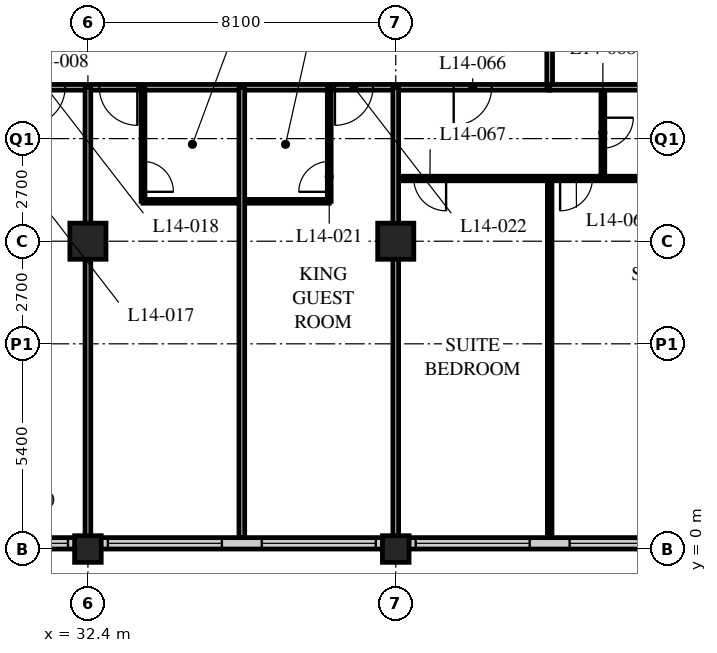
"""IFC4 building model, lengths in metres.
Left out: names, types, materials, properties, quantities, classifications, styles, units other than length and angle.
Written with IfcOpenShell. Run it as: python <this file> out.ifc"""

import sys

from ifc_helpers import new_model, si_unit, direction, frame, frame_2d, origin, origin_2d, place, context, subcontext, project, spatial, rectangle, hollow_rectangle, extrude, element, fill, save


model = new_model("IFC4")
c1 = context("Model", 3, precision=1e-05, world=origin(), true_north=direction((0.0, 1.0)))
c2 = subcontext(c1, "Body", "Model", "MODEL_VIEW")
j1 = project(units=[si_unit("LENGTHUNIT", "METRE"), si_unit("PLANEANGLEUNIT", "RADIAN")], contexts=[c1])
p1 = place(None, origin())
s1 = spatial("IfcSite", under=j1, at=p1, CompositionType="ELEMENT")
p2 = place(p1, origin())
s2 = spatial("IfcBuilding", under=s1, at=p2, CompositionType="ELEMENT")
p3 = place(p2, frame((0.0, 0.0, 60.2)))
s3 = spatial("IfcBuildingStorey", under=s2, at=p3, CompositionType="ELEMENT", Elevation=60.2)
p4 = place(p3, frame((32.4, 0.0, 0.0), z_axis=(0.0, 0.0, 1.0), x_axis=(1.0, 0.0, 0.0)))
e1 = element("IfcColumn", 1, at=p4, inside=s3, PredefinedType="COLUMN", context=c2, shape_type="SweptSolid", body=[
    extrude(hollow_rectangle(XDim=0.7, YDim=0.7, WallThickness=0.06, at=origin_2d()), origin(), (0.0, 0.0, 1.0), 3.4),
])
p5 = place(p3, frame((32.4, 8.1, 0.0), z_axis=(0.0, 0.0, 1.0), x_axis=(1.0, 0.0, 0.0)))
e2 = element("IfcColumn", 2, at=p5, inside=s3, PredefinedType="COLUMN", context=c2, shape_type="SweptSolid", body=[
    extrude(hollow_rectangle(XDim=0.95, YDim=0.95, WallThickness=0.095, at=origin_2d()), origin(), (0.0, 0.0, 1.0), 3.4),
])
p6 = place(p3, frame((40.5, 0.0, 0.0), z_axis=(0.0, 0.0, 1.0), x_axis=(1.0, 0.0, 0.0)))
e3 = element("IfcColumn", 3, at=p6, inside=s3, PredefinedType="COLUMN", context=c2, shape_type="SweptSolid", body=[
    extrude(hollow_rectangle(XDim=0.7, YDim=0.7, WallThickness=0.06, at=origin_2d()), origin(), (0.0, 0.0, 1.0), 3.4),
])
p7 = place(p3, frame((40.5, 8.1, 0.0), z_axis=(0.0, 0.0, 1.0), x_axis=(1.0, 0.0, 0.0)))
e4 = element("IfcColumn", 4, at=p7, inside=s3, PredefinedType="COLUMN", context=c2, shape_type="SweptSolid", body=[
    extrude(hollow_rectangle(XDim=0.95, YDim=0.95, WallThickness=0.095, at=origin_2d()), origin(), (0.0, 0.0, 1.0), 3.4),
])
p8 = place(p3, frame((8.4, 0.15, 0.0), z_axis=(0.0, 0.0, 1.0), x_axis=(1.0, 0.0, 0.0)))
e5 = element("IfcWall", 5, at=p8, inside=s3, PredefinedType="SOLIDWALL", context=c2, shape_type="SweptSolid", body=[
    extrude(rectangle(XDim=40.2, YDim=0.3, at=frame_2d((20.1, 0.0))), origin(), (0.0, 0.0, 1.0), 3.19),
])
p9 = place(p8, frame((0.225, 0.0, 0.9)))
e6 = element("IfcOpeningElement", 6, at=p9, cuts=e5, PredefinedType="OPENING", context=c2, shape_type="SweptSolid", body=[
    extrude(rectangle(XDim=3.0, YDim=2.0, at=frame_2d((1.5, 1.0))), frame((0.0, 0.16, 0.0), z_axis=(0.0, -1.0, 0.0), x_axis=(1.0, 0.0, 0.0)), (0.0, 0.0, 1.0), 0.32),
])
p10 = place(p8, frame((4.275, 0.0, 0.9)))
e7 = element("IfcOpeningElement", 7, at=p10, cuts=e5, PredefinedType="OPENING", context=c2, shape_type="SweptSolid", body=[
    extrude(rectangle(XDim=3.0, YDim=2.0, at=frame_2d((1.5, 1.0))), frame((0.0, 0.16, 0.0), z_axis=(0.0, -1.0, 0.0), x_axis=(1.0, 0.0, 0.0)), (0.0, 0.0, 1.0), 0.32),
])
p11 = place(p8, frame((8.325, 0.0, 0.9)))
e8 = element("IfcOpeningElement", 8, at=p11, cuts=e5, PredefinedType="OPENING", context=c2, shape_type="SweptSolid", body=[
    extrude(rectangle(XDim=3.0, YDim=2.0, at=frame_2d((1.5, 1.0))), frame((0.0, 0.16, 0.0), z_axis=(0.0, -1.0, 0.0), x_axis=(1.0, 0.0, 0.0)), (0.0, 0.0, 1.0), 0.32),
])
p12 = place(p8, frame((12.375, 0.0, 0.9)))
e9 = element("IfcOpeningElement", 9, at=p12, cuts=e5, PredefinedType="OPENING", context=c2, shape_type="SweptSolid", body=[
    extrude(rectangle(XDim=3.0, YDim=2.0, at=frame_2d((1.5, 1.0))), frame((0.0, 0.16, 0.0), z_axis=(0.0, -1.0, 0.0), x_axis=(1.0, 0.0, 0.0)), (0.0, 0.0, 1.0), 0.32),
])
p13 = place(p8, frame((16.425, 0.0, 0.9)))
e10 = element("IfcOpeningElement", 10, at=p13, cuts=e5, PredefinedType="OPENING", context=c2, shape_type="SweptSolid", body=[
    extrude(rectangle(XDim=3.0, YDim=2.0, at=frame_2d((1.5, 1.0))), frame((0.0, 0.16, 0.0), z_axis=(0.0, -1.0, 0.0), x_axis=(1.0, 0.0, 0.0)), (0.0, 0.0, 1.0), 0.32),
])
p14 = place(p8, frame((20.475, 0.0, 0.9)))
e11 = element("IfcOpeningElement", 11, at=p14, cuts=e5, PredefinedType="OPENING", context=c2, shape_type="SweptSolid", body=[
    extrude(rectangle(XDim=3.0, YDim=2.0, at=frame_2d((1.5, 1.0))), frame((0.0, 0.16, 0.0), z_axis=(0.0, -1.0, 0.0), x_axis=(1.0, 0.0, 0.0)), (0.0, 0.0, 1.0), 0.32),
])
p15 = place(p8, frame((24.525, 0.0, 0.9)))
e12 = element("IfcOpeningElement", 12, at=p15, cuts=e5, PredefinedType="OPENING", context=c2, shape_type="SweptSolid", body=[
    extrude(rectangle(XDim=3.0, YDim=2.0, at=frame_2d((1.5, 1.0))), frame((0.0, 0.16, 0.0), z_axis=(0.0, -1.0, 0.0), x_axis=(1.0, 0.0, 0.0)), (0.0, 0.0, 1.0), 0.32),
])
p16 = place(p8, frame((28.575, 0.0, 0.9)))
e13 = element("IfcOpeningElement", 13, at=p16, cuts=e5, PredefinedType="OPENING", context=c2, shape_type="SweptSolid", body=[
    extrude(rectangle(XDim=3.0, YDim=2.0, at=frame_2d((1.5, 1.0))), frame((0.0, 0.16, 0.0), z_axis=(0.0, -1.0, 0.0), x_axis=(1.0, 0.0, 0.0)), (0.0, 0.0, 1.0), 0.32),
])
p17 = place(p8, frame((32.625, 0.0, 0.9)))
e14 = element("IfcOpeningElement", 14, at=p17, cuts=e5, PredefinedType="OPENING", context=c2, shape_type="SweptSolid", body=[
    extrude(rectangle(XDim=3.0, YDim=2.0, at=frame_2d((1.5, 1.0))), frame((0.0, 0.16, 0.0), z_axis=(0.0, -1.0, 0.0), x_axis=(1.0, 0.0, 0.0)), (0.0, 0.0, 1.0), 0.32),
])
p18 = place(p8, frame((36.675, 0.0, 0.9)))
e15 = element("IfcOpeningElement", 15, at=p18, cuts=e5, PredefinedType="OPENING", context=c2, shape_type="SweptSolid", body=[
    extrude(rectangle(XDim=3.0, YDim=2.0, at=frame_2d((1.5, 1.0))), frame((0.0, 0.16, 0.0), z_axis=(0.0, -1.0, 0.0), x_axis=(1.0, 0.0, 0.0)), (0.0, 0.0, 1.0), 0.32),
])
p19 = place(p3, frame((12.15, 12.15, 0.0), z_axis=(0.0, 0.0, 1.0), x_axis=(1.0, 0.0, 0.0)))
e16 = element("IfcWall", 16, at=p19, inside=s3, PredefinedType="PARTITIONING", context=c2, shape_type="SweptSolid", body=[
    extrude(rectangle(XDim=32.4, YDim=0.15, at=frame_2d((16.2, 0.0))), origin(), (0.0, 0.0, 1.0), 3.19),
])
p20 = place(p19, frame((6.5, 0.0, 0.0)))
e17 = element("IfcOpeningElement", 17, at=p20, cuts=e16, PredefinedType="OPENING", context=c2, shape_type="SweptSolid", body=[
    extrude(rectangle(XDim=1.0, YDim=2.1, at=frame_2d((0.5, 1.05))), frame((0.0, 0.085, 0.0), z_axis=(0.0, -1.0, 0.0), x_axis=(1.0, 0.0, 0.0)), (0.0, 0.0, 1.0), 0.17),
])
p21 = place(p19, frame((8.4, 0.0, 0.0)))
e18 = element("IfcOpeningElement", 18, at=p21, cuts=e16, PredefinedType="OPENING", context=c2, shape_type="SweptSolid", body=[
    extrude(rectangle(XDim=1.0, YDim=2.1, at=frame_2d((0.5, 1.05))), frame((0.0, 0.085, 0.0), z_axis=(0.0, -1.0, 0.0), x_axis=(1.0, 0.0, 0.0)), (0.0, 0.0, 1.0), 0.17),
])
p22 = place(p19, frame((14.6, 0.0, 0.0)))
e19 = element("IfcOpeningElement", 19, at=p22, cuts=e16, PredefinedType="OPENING", context=c2, shape_type="SweptSolid", body=[
    extrude(rectangle(XDim=1.0, YDim=2.1, at=frame_2d((0.5, 1.05))), frame((0.0, 0.085, 0.0), z_axis=(0.0, -1.0, 0.0), x_axis=(1.0, 0.0, 0.0)), (0.0, 0.0, 1.0), 0.17),
])
p23 = place(p19, frame((18.65, 0.0, 0.0)))
e20 = element("IfcOpeningElement", 20, at=p23, cuts=e16, PredefinedType="OPENING", context=c2, shape_type="SweptSolid", body=[
    extrude(rectangle(XDim=1.0, YDim=2.1, at=frame_2d((0.5, 1.05))), frame((0.0, 0.085, 0.0), z_axis=(0.0, -1.0, 0.0), x_axis=(1.0, 0.0, 0.0)), (0.0, 0.0, 1.0), 0.17),
])
p24 = place(p19, frame((20.55, 0.0, 0.0)))
e21 = element("IfcOpeningElement", 21, at=p24, cuts=e16, PredefinedType="OPENING", context=c2, shape_type="SweptSolid", body=[
    extrude(rectangle(XDim=1.0, YDim=2.1, at=frame_2d((0.5, 1.05))), frame((0.0, 0.085, 0.0), z_axis=(0.0, -1.0, 0.0), x_axis=(1.0, 0.0, 0.0)), (0.0, 0.0, 1.0), 0.17),
])
p25 = place(p19, frame((26.75, 0.0, 0.0)))
e22 = element("IfcOpeningElement", 22, at=p25, cuts=e16, PredefinedType="OPENING", context=c2, shape_type="SweptSolid", body=[
    extrude(rectangle(XDim=1.0, YDim=2.1, at=frame_2d((0.5, 1.05))), frame((0.0, 0.085, 0.0), z_axis=(0.0, -1.0, 0.0), x_axis=(1.0, 0.0, 0.0)), (0.0, 0.0, 1.0), 0.17),
])
p26 = place(p19, frame((1.525, 0.0, 0.0)))
e23 = element("IfcOpeningElement", 23, at=p26, cuts=e16, PredefinedType="OPENING", context=c2, shape_type="SweptSolid", body=[
    extrude(rectangle(XDim=1.0, YDim=2.1, at=frame_2d((0.5, 1.05))), frame((0.0, 0.085, 0.0), z_axis=(0.0, -1.0, 0.0), x_axis=(1.0, 0.0, 0.0)), (0.0, 0.0, 1.0), 0.17),
])
p27 = place(p19, frame((29.875, 0.0, 0.0)))
e24 = element("IfcOpeningElement", 24, at=p27, cuts=e16, PredefinedType="OPENING", context=c2, shape_type="SweptSolid", body=[
    extrude(rectangle(XDim=1.0, YDim=2.1, at=frame_2d((0.5, 1.05))), frame((0.0, 0.085, 0.0), z_axis=(0.0, -1.0, 0.0), x_axis=(1.0, 0.0, 0.0)), (0.0, 0.0, 1.0), 0.17),
])
p28 = place(p3, frame((44.55, 12.15, 0.0), z_axis=(0.0, 0.0, 1.0), x_axis=(0.0, 1.0, 0.0)))
e25 = element("IfcWall", 25, at=p28, inside=s3, PredefinedType="PARTITIONING", context=c2, shape_type="SweptSolid", body=[
    extrude(rectangle(XDim=30.15, YDim=0.15, at=frame_2d((15.075, 0.0))), origin(), (0.0, 0.0, 1.0), 3.19),
])
p29 = place(p28, frame((2.75, 0.0, 0.0)))
e26 = element("IfcOpeningElement", 26, at=p29, cuts=e25, PredefinedType="OPENING", context=c2, shape_type="SweptSolid", body=[
    extrude(rectangle(XDim=1.0, YDim=2.1, at=frame_2d((0.5, 1.05))), frame((0.0, 0.085, 0.0), z_axis=(0.0, -1.0, 0.0), x_axis=(1.0, 0.0, 0.0)), (0.0, 0.0, 1.0), 0.17),
])
p30 = place(p28, frame((6.5, 0.0, 0.0)))
e27 = element("IfcOpeningElement", 27, at=p30, cuts=e25, PredefinedType="OPENING", context=c2, shape_type="SweptSolid", body=[
    extrude(rectangle(XDim=1.0, YDim=2.1, at=frame_2d((0.5, 1.05))), frame((0.0, 0.085, 0.0), z_axis=(0.0, -1.0, 0.0), x_axis=(1.0, 0.0, 0.0)), (0.0, 0.0, 1.0), 0.17),
])
p31 = place(p28, frame((10.55, 0.0, 0.0)))
e28 = element("IfcOpeningElement", 28, at=p31, cuts=e25, PredefinedType="OPENING", context=c2, shape_type="SweptSolid", body=[
    extrude(rectangle(XDim=1.0, YDim=2.1, at=frame_2d((0.5, 1.05))), frame((0.0, 0.085, 0.0), z_axis=(0.0, -1.0, 0.0), x_axis=(1.0, 0.0, 0.0)), (0.0, 0.0, 1.0), 0.17),
])
p32 = place(p28, frame((14.6, 0.0, 0.0)))
e29 = element("IfcOpeningElement", 29, at=p32, cuts=e25, PredefinedType="OPENING", context=c2, shape_type="SweptSolid", body=[
    extrude(rectangle(XDim=1.0, YDim=2.1, at=frame_2d((0.5, 1.05))), frame((0.0, 0.085, 0.0), z_axis=(0.0, -1.0, 0.0), x_axis=(1.0, 0.0, 0.0)), (0.0, 0.0, 1.0), 0.17),
])
p33 = place(p28, frame((18.65, 0.0, 0.0)))
e30 = element("IfcOpeningElement", 30, at=p33, cuts=e25, PredefinedType="OPENING", context=c2, shape_type="SweptSolid", body=[
    extrude(rectangle(XDim=1.0, YDim=2.1, at=frame_2d((0.5, 1.05))), frame((0.0, 0.085, 0.0), z_axis=(0.0, -1.0, 0.0), x_axis=(1.0, 0.0, 0.0)), (0.0, 0.0, 1.0), 0.17),
])
p34 = place(p28, frame((22.7, 0.0, 0.0)))
e31 = element("IfcOpeningElement", 31, at=p34, cuts=e25, PredefinedType="OPENING", context=c2, shape_type="SweptSolid", body=[
    extrude(rectangle(XDim=1.0, YDim=2.1, at=frame_2d((0.5, 1.05))), frame((0.0, 0.085, 0.0), z_axis=(0.0, -1.0, 0.0), x_axis=(1.0, 0.0, 0.0)), (0.0, 0.0, 1.0), 0.17),
])
p35 = place(p28, frame((26.7, 0.0, 0.0)))
e32 = element("IfcOpeningElement", 32, at=p35, cuts=e25, PredefinedType="OPENING", context=c2, shape_type="SweptSolid", body=[
    extrude(rectangle(XDim=1.0, YDim=2.1, at=frame_2d((0.5, 1.05))), frame((0.0, 0.085, 0.0), z_axis=(0.0, -1.0, 0.0), x_axis=(1.0, 0.0, 0.0)), (0.0, 0.0, 1.0), 0.17),
])
p36 = place(p3, frame((32.4, 12.15, 0.0), z_axis=(0.0, 0.0, 1.0), x_axis=(0.0, -1.0, 0.0)))
e33 = element("IfcWall", 33, at=p36, inside=s3, PredefinedType="PARTITIONING", context=c2, shape_type="SweptSolid", body=[
    extrude(rectangle(XDim=11.85, YDim=0.15, at=frame_2d((5.925, 0.0))), origin(), (0.0, 0.0, 1.0), 2.578),
])
p37 = place(p3, frame((33.85, 9.15, 0.0), z_axis=(0.0, 0.0, 1.0), x_axis=(1.0, 0.0, 0.0)))
e34 = element("IfcWall", 34, at=p37, inside=s3, PredefinedType="PARTITIONING", context=c2, shape_type="SweptSolid", body=[
    extrude(rectangle(XDim=4.9, YDim=0.1, at=frame_2d((2.45, 0.0))), origin(), (0.0, 0.0, 1.0), 3.19),
])
p38 = place(p3, frame((33.85, 12.15, 0.0), z_axis=(0.0, 0.0, 1.0), x_axis=(0.0, -1.0, 0.0)))
e35 = element("IfcWall", 35, at=p38, inside=s3, PredefinedType="PARTITIONING", context=c2, shape_type="SweptSolid", body=[
    extrude(rectangle(XDim=3.0, YDim=0.1, at=frame_2d((1.5, 0.0))), origin(), (0.0, 0.0, 1.0), 3.19),
])
p39 = place(p38, frame((1.95, 0.0, 0.0)))
e36 = element("IfcOpeningElement", 36, at=p39, cuts=e35, PredefinedType="OPENING", context=c2, shape_type="SweptSolid", body=[
    extrude(rectangle(XDim=0.8, YDim=2.1, at=frame_2d((0.4, 1.05))), frame((0.0, 0.06, 0.0), z_axis=(0.0, -1.0, 0.0), x_axis=(1.0, 0.0, 0.0)), (0.0, 0.0, 1.0), 0.12),
])
p40 = place(p3, frame((36.45, 12.15, 0.0), z_axis=(0.0, 0.0, 1.0), x_axis=(0.0, -1.0, 0.0)))
e37 = element("IfcWall", 37, at=p40, inside=s3, PredefinedType="PARTITIONING", context=c2, shape_type="SweptSolid", body=[
    extrude(rectangle(XDim=11.85, YDim=0.15, at=frame_2d((5.925, 0.0))), origin(), (0.0, 0.0, 1.0), 3.19),
])
p41 = place(p3, frame((38.75, 12.15, 0.0), z_axis=(0.0, 0.0, 1.0), x_axis=(0.0, -1.0, 0.0)))
e38 = element("IfcWall", 38, at=p41, inside=s3, PredefinedType="PARTITIONING", context=c2, shape_type="SweptSolid", body=[
    extrude(rectangle(XDim=3.0, YDim=0.1, at=frame_2d((1.5, 0.0))), origin(), (0.0, 0.0, 1.0), 3.19),
])
p42 = place(p41, frame((1.95, 0.0, 0.0)))
e39 = element("IfcOpeningElement", 39, at=p42, cuts=e38, PredefinedType="OPENING", context=c2, shape_type="SweptSolid", body=[
    extrude(rectangle(XDim=0.8, YDim=2.1, at=frame_2d((0.4, 1.05))), frame((0.0, 0.06, 0.0), z_axis=(0.0, -1.0, 0.0), x_axis=(1.0, 0.0, 0.0)), (0.0, 0.0, 1.0), 0.12),
])
p43 = place(p3, frame((40.5, 9.75, 0.0), z_axis=(0.0, 0.0, 1.0), x_axis=(1.0, 0.0, 0.0)))
e40 = element("IfcWall", 40, at=p43, inside=s3, PredefinedType="PARTITIONING", context=c2, shape_type="SweptSolid", body=[
    extrude(rectangle(XDim=8.05, YDim=0.12, at=frame_2d((4.025, 0.0))), origin(), (0.0, 0.0, 1.0), 3.19),
])
p44 = place(p43, frame((0.475, 0.0, 0.0)))
e41 = element("IfcOpeningElement", 41, at=p44, cuts=e40, PredefinedType="OPENING", context=c2, shape_type="SweptSolid", body=[
    extrude(rectangle(XDim=0.85, YDim=2.1, at=frame_2d((0.425, 1.05))), frame((0.0, 0.07, 0.0), z_axis=(0.0, -1.0, 0.0), x_axis=(1.0, 0.0, 0.0)), (0.0, 0.0, 1.0), 0.14),
])
p45 = place(p43, frame((4.325, 0.0, 0.0)))
e42 = element("IfcOpeningElement", 42, at=p45, cuts=e40, PredefinedType="OPENING", context=c2, shape_type="SweptSolid", body=[
    extrude(rectangle(XDim=0.85, YDim=2.1, at=frame_2d((0.425, 1.05))), frame((0.0, 0.07, 0.0), z_axis=(0.0, -1.0, 0.0), x_axis=(1.0, 0.0, 0.0)), (0.0, 0.0, 1.0), 0.14),
])
p46 = place(p3, frame((45.95, 12.15, 0.0), z_axis=(0.0, 0.0, 1.0), x_axis=(0.0, -1.0, 0.0)))
e43 = element("IfcWall", 43, at=p46, inside=s3, PredefinedType="PARTITIONING", context=c2, shape_type="SweptSolid", body=[
    extrude(rectangle(XDim=2.4, YDim=0.1, at=frame_2d((1.2, 0.0))), origin(), (0.0, 0.0, 1.0), 3.19),
])
p47 = place(p46, frame((0.8, 0.0, 0.0)))
e44 = element("IfcOpeningElement", 44, at=p47, cuts=e43, PredefinedType="OPENING", context=c2, shape_type="SweptSolid", body=[
    extrude(rectangle(XDim=0.8, YDim=2.1, at=frame_2d((0.4, 1.05))), frame((0.0, 0.06, 0.0), z_axis=(0.0, -1.0, 0.0), x_axis=(1.0, 0.0, 0.0)), (0.0, 0.0, 1.0), 0.12),
])
p48 = place(p3, frame((44.55, 9.75, 0.0), z_axis=(0.0, 0.0, 1.0), x_axis=(0.0, -1.0, 0.0)))
e45 = element("IfcWall", 45, at=p48, inside=s3, PredefinedType="PARTITIONING", context=c2, shape_type="SweptSolid", body=[
    extrude(rectangle(XDim=9.45, YDim=0.12, at=frame_2d((4.725, 0.0))), origin(), (0.0, 0.0, 1.0), 3.19),
])
p49 = place(p3, frame((44.55, 12.15, 0.0), z_axis=(0.0, 0.0, 1.0), x_axis=(1.0, 0.0, 0.0)))
e46 = element("IfcWall", 46, at=p49, inside=s3, PredefinedType="PARTITIONING", context=c2, shape_type="SweptSolid", body=[
    extrude(rectangle(XDim=11.85, YDim=0.15, at=frame_2d((5.925, 0.0))), origin(), (0.0, 0.0, 1.0), 3.19),
])
p50 = place(p3, frame((40.5, 12.15, 0.0), z_axis=(0.0, 0.0, 1.0), x_axis=(0.0, -1.0, 0.0)))
e47 = element("IfcWall", 47, at=p50, inside=s3, PredefinedType="PARTITIONING", context=c2, shape_type="SweptSolid", body=[
    extrude(rectangle(XDim=11.85, YDim=0.15, at=frame_2d((5.925, 0.0))), origin(), (0.0, 0.0, 1.0), 2.578),
])
p51 = place(p14, origin())
e48 = element("IfcWindow", 48, at=p51, inside=s3, PartitioningType="SINGLE_PANEL", PredefinedType="WINDOW", context=c2, shape_type="SweptSolid", body=[
    extrude(rectangle(XDim=3.0, YDim=2.0, at=frame_2d((1.5, 1.0))), frame((0.0, 0.03, 0.0), z_axis=(0.0, -1.0, 0.0), x_axis=(1.0, 0.0, 0.0)), (0.0, 0.0, 1.0), 0.06),
])
fill(e11, e48)
p52 = place(p15, origin())
e49 = element("IfcWindow", 49, at=p52, inside=s3, PartitioningType="SINGLE_PANEL", PredefinedType="WINDOW", context=c2, shape_type="SweptSolid", body=[
    extrude(rectangle(XDim=3.0, YDim=2.0, at=frame_2d((1.5, 1.0))), frame((0.0, 0.03, 0.0), z_axis=(0.0, -1.0, 0.0), x_axis=(1.0, 0.0, 0.0)), (0.0, 0.0, 1.0), 0.06),
])
fill(e12, e49)
p53 = place(p16, origin())
e50 = element("IfcWindow", 50, at=p53, inside=s3, PartitioningType="SINGLE_PANEL", PredefinedType="WINDOW", context=c2, shape_type="SweptSolid", body=[
    extrude(rectangle(XDim=3.0, YDim=2.0, at=frame_2d((1.5, 1.0))), frame((0.0, 0.03, 0.0), z_axis=(0.0, -1.0, 0.0), x_axis=(1.0, 0.0, 0.0)), (0.0, 0.0, 1.0), 0.06),
])
fill(e13, e50)
p54 = place(p17, origin())
e51 = element("IfcWindow", 51, at=p54, inside=s3, PartitioningType="SINGLE_PANEL", PredefinedType="WINDOW", context=c2, shape_type="SweptSolid", body=[
    extrude(rectangle(XDim=3.0, YDim=2.0, at=frame_2d((1.5, 1.0))), frame((0.0, 0.03, 0.0), z_axis=(0.0, -1.0, 0.0), x_axis=(1.0, 0.0, 0.0)), (0.0, 0.0, 1.0), 0.06),
])
fill(e14, e51)
p55 = place(p18, origin())
e52 = element("IfcWindow", 52, at=p55, inside=s3, PartitioningType="SINGLE_PANEL", PredefinedType="WINDOW", context=c2, shape_type="SweptSolid", body=[
    extrude(rectangle(XDim=3.0, YDim=2.0, at=frame_2d((1.5, 1.0))), frame((0.0, 0.03, 0.0), z_axis=(0.0, -1.0, 0.0), x_axis=(1.0, 0.0, 0.0)), (0.0, 0.0, 1.0), 0.06),
])
fill(e15, e52)
p56 = place(p23, origin())
e53 = element("IfcDoor", 53, at=p56, inside=s3, OperationType="SINGLE_SWING_RIGHT", PredefinedType="DOOR", context=c2, shape_type="SweptSolid", body=[
    extrude(rectangle(XDim=1.0, YDim=2.1, at=frame_2d((0.5, 1.05))), frame((0.0, 0.025, 0.0), z_axis=(0.0, -1.0, 0.0), x_axis=(1.0, 0.0, 0.0)), (0.0, 0.0, 1.0), 0.05),
])
fill(e20, e53)
p57 = place(p39, origin())
e54 = element("IfcDoor", 54, at=p57, inside=s3, OperationType="SINGLE_SWING_RIGHT", PredefinedType="DOOR", context=c2, shape_type="SweptSolid", body=[
    extrude(rectangle(XDim=0.8, YDim=2.1, at=frame_2d((0.4, 1.05))), frame((0.0, 0.025, 0.0), z_axis=(0.0, -1.0, 0.0), x_axis=(1.0, 0.0, 0.0)), (0.0, 0.0, 1.0), 0.05),
])
fill(e36, e54)
p58 = place(p24, origin())
e55 = element("IfcDoor", 55, at=p58, inside=s3, OperationType="SINGLE_SWING_LEFT", PredefinedType="DOOR", context=c2, shape_type="SweptSolid", body=[
    extrude(rectangle(XDim=1.0, YDim=2.1, at=frame_2d((0.5, 1.05))), frame((0.0, 0.025, 0.0), z_axis=(0.0, -1.0, 0.0), x_axis=(1.0, 0.0, 0.0)), (0.0, 0.0, 1.0), 0.05),
])
fill(e21, e55)
p59 = place(p42, origin())
e56 = element("IfcDoor", 56, at=p59, inside=s3, OperationType="SINGLE_SWING_LEFT", PredefinedType="DOOR", context=c2, shape_type="SweptSolid", body=[
    extrude(rectangle(XDim=0.8, YDim=2.1, at=frame_2d((0.4, 1.05))), frame((0.0, 0.025, 0.0), z_axis=(0.0, -1.0, 0.0), x_axis=(1.0, 0.0, 0.0)), (0.0, 0.0, 1.0), 0.05),
])
fill(e39, e56)
p60 = place(p25, origin())
e57 = element("IfcDoor", 57, at=p60, inside=s3, OperationType="SINGLE_SWING_RIGHT", PredefinedType="DOOR", context=c2, shape_type="SweptSolid", body=[
    extrude(rectangle(XDim=1.0, YDim=2.1, at=frame_2d((0.5, 1.05))), frame((0.0, 0.025, 0.0), z_axis=(0.0, -1.0, 0.0), x_axis=(1.0, 0.0, 0.0)), (0.0, 0.0, 1.0), 0.05),
])
fill(e22, e57)
p61 = place(p27, origin())
e58 = element("IfcDoor", 58, at=p61, inside=s3, OperationType="SINGLE_SWING_RIGHT", PredefinedType="DOOR", context=c2, shape_type="SweptSolid", body=[
    extrude(rectangle(XDim=1.0, YDim=2.1, at=frame_2d((0.5, 1.05))), frame((0.0, 0.025, 0.0), z_axis=(0.0, -1.0, 0.0), x_axis=(1.0, 0.0, 0.0)), (0.0, 0.0, 1.0), 0.05),
])
fill(e24, e58)
p62 = place(p44, origin())
e59 = element("IfcDoor", 59, at=p62, inside=s3, OperationType="SINGLE_SWING_LEFT", PredefinedType="DOOR", context=c2, shape_type="SweptSolid", body=[
    extrude(rectangle(XDim=0.85, YDim=2.1, at=frame_2d((0.425, 1.05))), frame((0.0, 0.025, 0.0), z_axis=(0.0, -1.0, 0.0), x_axis=(1.0, 0.0, 0.0)), (0.0, 0.0, 1.0), 0.05),
])
fill(e41, e59)
p63 = place(p47, origin())
e60 = element("IfcDoor", 60, at=p63, inside=s3, OperationType="SINGLE_SWING_LEFT", PredefinedType="DOOR", context=c2, shape_type="SweptSolid", body=[
    extrude(rectangle(XDim=0.8, YDim=2.1, at=frame_2d((0.4, 1.05))), frame((0.0, 0.025, 0.0), z_axis=(0.0, -1.0, 0.0), x_axis=(1.0, 0.0, 0.0)), (0.0, 0.0, 1.0), 0.05),
])
fill(e44, e60)
p64 = place(p45, origin())
e61 = element("IfcDoor", 61, at=p64, inside=s3, OperationType="SINGLE_SWING_RIGHT", PredefinedType="DOOR", context=c2, shape_type="SweptSolid", body=[
    extrude(rectangle(XDim=0.85, YDim=2.1, at=frame_2d((0.425, 1.05))), frame((0.0, 0.025, 0.0), z_axis=(0.0, -1.0, 0.0), x_axis=(1.0, 0.0, 0.0)), (0.0, 0.0, 1.0), 0.05),
])
fill(e42, e61)
save(model, sys.argv[1])
